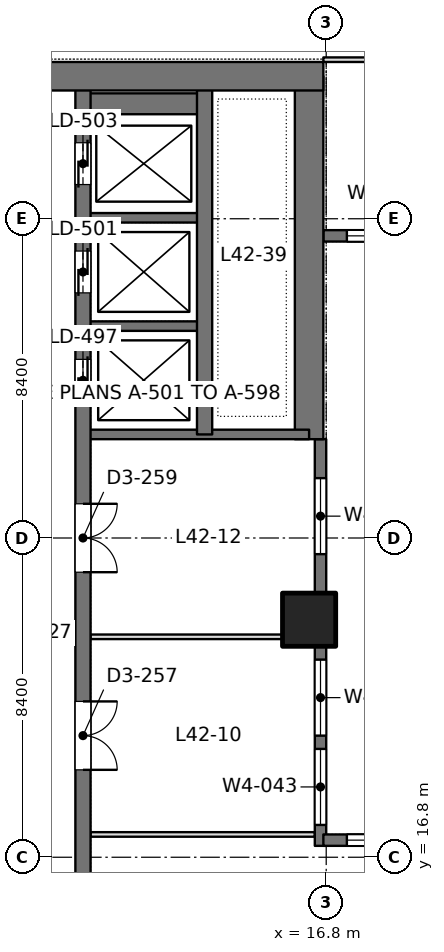
"""IFC4 building model, lengths in metres.
Left out: names, types, materials, properties, quantities, classifications, styles, units other than length and angle.
Written with IfcOpenShell. Run it as: python <this file> out.ifc"""

import sys

from ifc_helpers import new_model, si_unit, direction, frame, frame_2d, origin, origin_2d, place, context, subcontext, project, spatial, rectangle, extrude, element, fill, save


model = new_model("IFC4")
c1 = context("Model", 3, precision=1e-05, world=origin(), true_north=direction((0.0, 1.0)))
c2 = subcontext(c1, "Body", "Model", "MODEL_VIEW")
j1 = project(units=[si_unit("LENGTHUNIT", "METRE"), si_unit("PLANEANGLEUNIT", "RADIAN")], contexts=[c1])
p1 = place(None, origin())
s1 = spatial("IfcSite", under=j1, at=p1, CompositionType="ELEMENT")
p2 = place(p1, origin())
s2 = spatial("IfcBuilding", under=s1, at=p2, CompositionType="ELEMENT")
p3 = place(p2, frame((0.0, 0.0, 186.0)))
s3 = spatial("IfcBuildingStorey", under=s2, at=p3, CompositionType="ELEMENT", Elevation=186.0)
p4 = place(p3, frame((16.35, 23.05, 0.0), z_axis=(0.0, 0.0, 1.0), x_axis=(1.0, 0.0, 0.0)))
e1 = element("IfcColumn", 1, at=p4, inside=s3, PredefinedType="COLUMN", context=c2, shape_type="SweptSolid", body=[
    extrude(rectangle(XDim=1.4, YDim=1.4, at=origin_2d()), origin(), (0.0, 0.0, 1.0), 4.2),
])
p5 = place(p3, frame((-1.125, 37.35, 0.0), z_axis=(0.0, 0.0, 1.0), x_axis=(1.0, 0.0, 0.0)))
e2 = element("IfcWall", 2, at=p5, inside=s3, PredefinedType="SHEAR", context=c2, shape_type="SweptSolid", body=[
    extrude(rectangle(XDim=17.85, YDim=0.75, at=frame_2d((8.925, 0.0))), origin(), (0.0, 0.0, 1.0), 4.2),
])
p6 = place(p5, frame((8.875, 0.0, 0.0)))
e3 = element("IfcOpeningElement", 3, at=p6, cuts=e2, PredefinedType="OPENING", context=c2, shape_type="SweptSolid", body=[
    extrude(rectangle(XDim=1.8, YDim=2.4, at=frame_2d((0.9, 1.2))), frame((0.0, 0.385, 0.0), z_axis=(0.0, -1.0, 0.0), x_axis=(1.0, 0.0, 0.0)), (0.0, 0.0, 1.0), 0.77),
])
p7 = place(p3, frame((16.35, 27.8, 0.0), z_axis=(0.0, 0.0, 1.0), x_axis=(0.0, 1.0, 0.0)))
e4 = element("IfcWall", 4, at=p7, inside=s3, PredefinedType="SHEAR", context=c2, shape_type="SweptSolid", body=[
    extrude(rectangle(XDim=9.55, YDim=0.75, at=frame_2d((4.775, 0.0))), origin(), (0.0, 0.0, 1.0), 4.2),
])
p8 = place(p3, frame((10.4, 13.05, 0.0), z_axis=(0.0, 0.0, 1.0), x_axis=(0.0, 1.0, 0.0)))
e5 = element("IfcWall", 5, at=p8, inside=s3, PredefinedType="SHEAR", context=c2, shape_type="SweptSolid", body=[
    extrude(rectangle(XDim=24.3, YDim=0.4, at=frame_2d((12.15, 0.0))), origin(), (0.0, 0.0, 1.0), 4.2),
])
p9 = place(p8, frame((15.75, 0.0, 0.0)))
e6 = element("IfcOpeningElement", 6, at=p9, cuts=e5, PredefinedType="OPENING", context=c2, shape_type="SweptSolid", body=[
    extrude(rectangle(XDim=1.1, YDim=2.2, at=frame_2d((0.55, 1.1))), frame((0.0, 0.21, 0.0), z_axis=(0.0, -1.0, 0.0), x_axis=(1.0, 0.0, 0.0)), (0.0, 0.0, 1.0), 0.42),
])
p10 = place(p8, frame((18.6, 0.0, 0.0)))
e7 = element("IfcOpeningElement", 7, at=p10, cuts=e5, PredefinedType="OPENING", context=c2, shape_type="SweptSolid", body=[
    extrude(rectangle(XDim=1.1, YDim=2.2, at=frame_2d((0.55, 1.1))), frame((0.0, 0.21, 0.0), z_axis=(0.0, -1.0, 0.0), x_axis=(1.0, 0.0, 0.0)), (0.0, 0.0, 1.0), 0.42),
])
p11 = place(p8, frame((21.45, 0.0, 0.0)))
e8 = element("IfcOpeningElement", 8, at=p11, cuts=e5, PredefinedType="OPENING", context=c2, shape_type="SweptSolid", body=[
    extrude(rectangle(XDim=1.1, YDim=2.2, at=frame_2d((0.55, 1.1))), frame((0.0, 0.21, 0.0), z_axis=(0.0, -1.0, 0.0), x_axis=(1.0, 0.0, 0.0)), (0.0, 0.0, 1.0), 0.42),
])
p12 = place(p8, frame((6.05, 0.0, 0.0)))
e9 = element("IfcOpeningElement", 9, at=p12, cuts=e5, PredefinedType="OPENING", context=c2, shape_type="SweptSolid", body=[
    extrude(rectangle(XDim=1.8, YDim=2.4, at=frame_2d((0.9, 1.2))), frame((0.0, 0.21, 0.0), z_axis=(0.0, -1.0, 0.0), x_axis=(1.0, 0.0, 0.0)), (0.0, 0.0, 1.0), 0.42),
])
p13 = place(p8, frame((11.25, 0.0, 0.0)))
e10 = element("IfcOpeningElement", 10, at=p13, cuts=e5, PredefinedType="OPENING", context=c2, shape_type="SweptSolid", body=[
    extrude(rectangle(XDim=1.8, YDim=2.4, at=frame_2d((0.9, 1.2))), frame((0.0, 0.21, 0.0), z_axis=(0.0, -1.0, 0.0), x_axis=(1.0, 0.0, 0.0)), (0.0, 0.0, 1.0), 0.42),
])
p14 = place(p3, frame((13.6, 27.925, 0.0), z_axis=(0.0, 0.0, 1.0), x_axis=(0.0, 1.0, 0.0)))
e11 = element("IfcWall", 11, at=p14, inside=s3, PredefinedType="SHEAR", context=c2, shape_type="SweptSolid", body=[
    extrude(rectangle(XDim=9.425, YDim=0.4, at=frame_2d((4.712, 0.0))), origin(), (0.0, 0.0, 1.0), 4.2),
])
p15 = place(p3, frame((10.4, 27.925, 0.0), z_axis=(0.0, 0.0, 1.0), x_axis=(1.0, 0.0, 0.0)))
e12 = element("IfcWall", 12, at=p15, inside=s3, PredefinedType="SHEAR", context=c2, shape_type="SweptSolid", body=[
    extrude(rectangle(XDim=5.95, YDim=0.25, at=frame_2d((2.975, 0.0))), origin(), (0.0, 0.0, 1.0), 4.2),
])
for number, where, z_axis, x_axis in (
    (13, (10.4, 30.775, 0.0), (0.0, 0.0, 1.0), (1.0, 0.0, 0.0)),
    (14, (10.4, 33.625, 0.0), (0.0, 0.0, 1.0), (1.0, 0.0, 0.0)),
):
    element("IfcWall", number, at=place(p3, frame(where, z_axis=z_axis, x_axis=x_axis)), inside=s3, PredefinedType="SHEAR", context=c2, shape_type="SweptSolid", body=[
        extrude(rectangle(XDim=3.2, YDim=0.25, at=frame_2d((1.6, 0.0))), origin(), (0.0, 0.0, 1.0), 4.2),
    ])
p16 = place(p3, frame((10.4, 36.625, 0.0), z_axis=(0.0, 0.0, 1.0), x_axis=(1.0, 0.0, 0.0)))
e15 = element("IfcWall", 15, at=p16, inside=s3, PredefinedType="SHEAR", context=c2, shape_type="SweptSolid", body=[
    extrude(rectangle(XDim=3.2, YDim=0.55, at=frame_2d((1.6, 0.0))), origin(), (0.0, 0.0, 1.0), 4.2),
])
p17 = place(p3, frame((16.65, 17.1, 0.0), z_axis=(0.0, 0.0, 1.0), x_axis=(0.0, 1.0, 0.0)))
e16 = element("IfcWall", 16, at=p17, inside=s3, PredefinedType="SOLIDWALL", context=c2, shape_type="SweptSolid", body=[
    extrude(rectangle(XDim=10.7, YDim=0.3, at=frame_2d((5.35, 0.0))), origin(), (0.0, 0.0, 1.0), 4.05),
])
p18 = place(p17, frame((0.55, 0.0, 0.9)))
e17 = element("IfcOpeningElement", 17, at=p18, cuts=e16, PredefinedType="OPENING", context=c2, shape_type="SweptSolid", body=[
    extrude(rectangle(XDim=2.0, YDim=1.9, at=frame_2d((1.0, 0.95))), frame((0.0, 0.16, 0.0), z_axis=(0.0, -1.0, 0.0), x_axis=(1.0, 0.0, 0.0)), (0.0, 0.0, 1.0), 0.32),
])
p19 = place(p17, frame((2.9, 0.0, 0.9)))
e18 = element("IfcOpeningElement", 18, at=p19, cuts=e16, PredefinedType="OPENING", context=c2, shape_type="SweptSolid", body=[
    extrude(rectangle(XDim=2.0, YDim=1.9, at=frame_2d((1.0, 0.95))), frame((0.0, 0.16, 0.0), z_axis=(0.0, -1.0, 0.0), x_axis=(1.0, 0.0, 0.0)), (0.0, 0.0, 1.0), 0.32),
])
p20 = place(p17, frame((7.675, 0.0, 0.9)))
e19 = element("IfcOpeningElement", 19, at=p20, cuts=e16, PredefinedType="OPENING", context=c2, shape_type="SweptSolid", body=[
    extrude(rectangle(XDim=2.0, YDim=1.9, at=frame_2d((1.0, 0.95))), frame((0.0, 0.16, 0.0), z_axis=(0.0, -1.0, 0.0), x_axis=(1.0, 0.0, 0.0)), (0.0, 0.0, 1.0), 0.32),
])
p21 = place(p3, frame((16.725, 17.25, 0.0), z_axis=(0.0, 0.0, 1.0), x_axis=(1.0, 0.0, 0.0)))
e20 = element("IfcWall", 20, at=p21, inside=s3, PredefinedType="SOLIDWALL", context=c2, shape_type="SweptSolid", body=[
    extrude(rectangle(XDim=7.925, YDim=0.3, at=frame_2d((3.962, 0.0))), origin(), (0.0, 0.0, 1.0), 4.05),
])
p22 = place(p21, frame((0.619, 0.0, 0.9)))
e21 = element("IfcOpeningElement", 21, at=p22, cuts=e20, PredefinedType="OPENING", context=c2, shape_type="SweptSolid", body=[
    extrude(rectangle(XDim=2.0, YDim=1.9, at=frame_2d((1.0, 0.95))), frame((0.0, 0.16, 0.0), z_axis=(0.0, -1.0, 0.0), x_axis=(1.0, 0.0, 0.0)), (0.0, 0.0, 1.0), 0.32),
])
p23 = place(p21, frame((3.238, 0.0, 0.9)))
e22 = element("IfcOpeningElement", 22, at=p23, cuts=e20, PredefinedType="OPENING", context=c2, shape_type="SweptSolid", body=[
    extrude(rectangle(XDim=2.0, YDim=1.9, at=frame_2d((1.0, 0.95))), frame((0.0, 0.16, 0.0), z_axis=(0.0, -1.0, 0.0), x_axis=(1.0, 0.0, 0.0)), (0.0, 0.0, 1.0), 0.32),
])
p24 = place(p21, frame((5.856, 0.0, 0.9)))
e23 = element("IfcOpeningElement", 23, at=p24, cuts=e20, PredefinedType="OPENING", context=c2, shape_type="SweptSolid", body=[
    extrude(rectangle(XDim=2.0, YDim=1.9, at=frame_2d((1.0, 0.95))), frame((0.0, 0.16, 0.0), z_axis=(0.0, -1.0, 0.0), x_axis=(1.0, 0.0, 0.0)), (0.0, 0.0, 1.0), 0.32),
])
p25 = place(p3, frame((16.725, 33.15, 0.0), z_axis=(0.0, 0.0, 1.0), x_axis=(1.0, 0.0, 0.0)))
e24 = element("IfcWall", 24, at=p25, inside=s3, PredefinedType="SOLIDWALL", context=c2, shape_type="SweptSolid", body=[
    extrude(rectangle(XDim=7.925, YDim=0.3, at=frame_2d((3.962, 0.0))), origin(), (0.0, 0.0, 1.0), 4.05),
])
p26 = place(p25, frame((0.619, 0.0, 0.9)))
e25 = element("IfcOpeningElement", 25, at=p26, cuts=e24, PredefinedType="OPENING", context=c2, shape_type="SweptSolid", body=[
    extrude(rectangle(XDim=2.0, YDim=1.9, at=frame_2d((1.0, 0.95))), frame((0.0, 0.16, 0.0), z_axis=(0.0, -1.0, 0.0), x_axis=(1.0, 0.0, 0.0)), (0.0, 0.0, 1.0), 0.32),
])
p27 = place(p25, frame((3.238, 0.0, 0.9)))
e26 = element("IfcOpeningElement", 26, at=p27, cuts=e24, PredefinedType="OPENING", context=c2, shape_type="SweptSolid", body=[
    extrude(rectangle(XDim=2.0, YDim=1.9, at=frame_2d((1.0, 0.95))), frame((0.0, 0.16, 0.0), z_axis=(0.0, -1.0, 0.0), x_axis=(1.0, 0.0, 0.0)), (0.0, 0.0, 1.0), 0.32),
])
p28 = place(p25, frame((5.856, 0.0, 0.9)))
e27 = element("IfcOpeningElement", 27, at=p28, cuts=e24, PredefinedType="OPENING", context=c2, shape_type="SweptSolid", body=[
    extrude(rectangle(XDim=2.0, YDim=1.9, at=frame_2d((1.0, 0.95))), frame((0.0, 0.16, 0.0), z_axis=(0.0, -1.0, 0.0), x_axis=(1.0, 0.0, 0.0)), (0.0, 0.0, 1.0), 0.32),
])
p29 = place(p3, frame((10.598, 17.4, 0.0), z_axis=(0.0, 0.0, 1.0), x_axis=(1.0, 0.0, 0.0)))
e28 = element("IfcWall", 28, at=p29, inside=s3, PredefinedType="PARTITIONING", context=c2, shape_type="SweptSolid", body=[
    extrude(rectangle(XDim=5.904, YDim=0.12, at=frame_2d((2.952, 0.0))), origin(), (0.0, 0.0, 1.0), 3.55),
])
p30 = place(p3, frame((10.598, 22.6, 0.0), z_axis=(0.0, 0.0, 1.0), x_axis=(1.0, 0.0, 0.0)))
e29 = element("IfcWall", 29, at=p30, inside=s3, PredefinedType="PARTITIONING", context=c2, shape_type="SweptSolid", body=[
    extrude(rectangle(XDim=5.053, YDim=0.12, at=frame_2d((2.526, 0.0))), origin(), (0.0, 0.0, 1.0), 4.05),
])
p31 = place(p3, frame((16.725, 37.785, 0.0), z_axis=(0.0, 0.0, 1.0), x_axis=(1.0, 0.0, 0.0)))
e30 = element("IfcWall", 30, at=p31, inside=s3, PredefinedType="PARTITIONING", context=c2, shape_type="SweptSolid", body=[
    extrude(rectangle(XDim=16.95, YDim=0.12, at=frame_2d((8.475, 0.0))), origin(), (0.0, 0.0, 1.0), 3.55),
])
p32 = place(p31, frame((7.575, 0.0, 0.0)))
e31 = element("IfcOpeningElement", 31, at=p32, cuts=e30, PredefinedType="OPENING", context=c2, shape_type="SweptSolid", body=[
    extrude(rectangle(XDim=1.8, YDim=2.2, at=frame_2d((0.9, 1.1))), frame((0.0, 0.07, 0.0), z_axis=(0.0, -1.0, 0.0), x_axis=(1.0, 0.0, 0.0)), (0.0, 0.0, 1.0), 0.14),
])
p33 = place(p18, origin())
e32 = element("IfcWindow", 32, at=p33, inside=s3, PartitioningType="SINGLE_PANEL", PredefinedType="WINDOW", context=c2, shape_type="SweptSolid", body=[
    extrude(rectangle(XDim=2.0, YDim=1.9, at=frame_2d((1.0, 0.95))), frame((0.0, 0.03, 0.0), z_axis=(0.0, -1.0, 0.0), x_axis=(1.0, 0.0, 0.0)), (0.0, 0.0, 1.0), 0.06),
])
fill(e17, e32)
p34 = place(p19, origin())
e33 = element("IfcWindow", 33, at=p34, inside=s3, PartitioningType="SINGLE_PANEL", PredefinedType="WINDOW", context=c2, shape_type="SweptSolid", body=[
    extrude(rectangle(XDim=2.0, YDim=1.9, at=frame_2d((1.0, 0.95))), frame((0.0, 0.03, 0.0), z_axis=(0.0, -1.0, 0.0), x_axis=(1.0, 0.0, 0.0)), (0.0, 0.0, 1.0), 0.06),
])
fill(e18, e33)
p35 = place(p20, origin())
e34 = element("IfcWindow", 34, at=p35, inside=s3, PartitioningType="SINGLE_PANEL", PredefinedType="WINDOW", context=c2, shape_type="SweptSolid", body=[
    extrude(rectangle(XDim=2.0, YDim=1.9, at=frame_2d((1.0, 0.95))), frame((0.0, 0.03, 0.0), z_axis=(0.0, -1.0, 0.0), x_axis=(1.0, 0.0, 0.0)), (0.0, 0.0, 1.0), 0.06),
])
fill(e19, e34)
p36 = place(p22, origin())
e35 = element("IfcWindow", 35, at=p36, inside=s3, PartitioningType="SINGLE_PANEL", PredefinedType="WINDOW", context=c2, shape_type="SweptSolid", body=[
    extrude(rectangle(XDim=2.0, YDim=1.9, at=frame_2d((1.0, 0.95))), frame((0.0, 0.03, 0.0), z_axis=(0.0, -1.0, 0.0), x_axis=(1.0, 0.0, 0.0)), (0.0, 0.0, 1.0), 0.06),
])
fill(e21, e35)
p37 = place(p26, origin())
e36 = element("IfcWindow", 36, at=p37, inside=s3, PartitioningType="SINGLE_PANEL", PredefinedType="WINDOW", context=c2, shape_type="SweptSolid", body=[
    extrude(rectangle(XDim=2.0, YDim=1.9, at=frame_2d((1.0, 0.95))), frame((0.0, 0.03, 0.0), z_axis=(0.0, -1.0, 0.0), x_axis=(1.0, 0.0, 0.0)), (0.0, 0.0, 1.0), 0.06),
])
fill(e25, e36)
p38 = place(p9, origin())
e37 = element("IfcDoor", 37, at=p38, inside=s3, OperationType="DOUBLE_DOOR_SLIDING", PredefinedType="DOOR", context=c2, shape_type="SweptSolid", body=[
    extrude(rectangle(XDim=1.1, YDim=2.2, at=frame_2d((0.55, 1.1))), frame((0.0, 0.025, 0.0), z_axis=(0.0, -1.0, 0.0), x_axis=(1.0, 0.0, 0.0)), (0.0, 0.0, 1.0), 0.05),
])
fill(e6, e37)
p39 = place(p10, origin())
e38 = element("IfcDoor", 38, at=p39, inside=s3, OperationType="DOUBLE_DOOR_SLIDING", PredefinedType="DOOR", context=c2, shape_type="SweptSolid", body=[
    extrude(rectangle(XDim=1.1, YDim=2.2, at=frame_2d((0.55, 1.1))), frame((0.0, 0.025, 0.0), z_axis=(0.0, -1.0, 0.0), x_axis=(1.0, 0.0, 0.0)), (0.0, 0.0, 1.0), 0.05),
])
fill(e7, e38)
p40 = place(p11, origin())
e39 = element("IfcDoor", 39, at=p40, inside=s3, OperationType="DOUBLE_DOOR_SLIDING", PredefinedType="DOOR", context=c2, shape_type="SweptSolid", body=[
    extrude(rectangle(XDim=1.1, YDim=2.2, at=frame_2d((0.55, 1.1))), frame((0.0, 0.025, 0.0), z_axis=(0.0, -1.0, 0.0), x_axis=(1.0, 0.0, 0.0)), (0.0, 0.0, 1.0), 0.05),
])
fill(e8, e39)
p41 = place(p12, frame((1.8, 0.0, 0.0), z_axis=(0.0, 0.0, 1.0), x_axis=(-1.0, 0.0, 0.0)))
e40 = element("IfcDoor", 40, at=p41, inside=s3, OperationType="DOUBLE_DOOR_SINGLE_SWING", PredefinedType="DOOR", context=c2, shape_type="SweptSolid", body=[
    extrude(rectangle(XDim=1.8, YDim=2.4, at=frame_2d((0.9, 1.2))), frame((0.0, 0.025, 0.0), z_axis=(0.0, -1.0, 0.0), x_axis=(1.0, 0.0, 0.0)), (0.0, 0.0, 1.0), 0.05),
])
fill(e9, e40)
p42 = place(p13, frame((1.8, 0.0, 0.0), z_axis=(0.0, 0.0, 1.0), x_axis=(-1.0, 0.0, 0.0)))
e41 = element("IfcDoor", 41, at=p42, inside=s3, OperationType="DOUBLE_DOOR_SINGLE_SWING", PredefinedType="DOOR", context=c2, shape_type="SweptSolid", body=[
    extrude(rectangle(XDim=1.8, YDim=2.4, at=frame_2d((0.9, 1.2))), frame((0.0, 0.025, 0.0), z_axis=(0.0, -1.0, 0.0), x_axis=(1.0, 0.0, 0.0)), (0.0, 0.0, 1.0), 0.05),
])
fill(e10, e41)
save(model, sys.argv[1])
